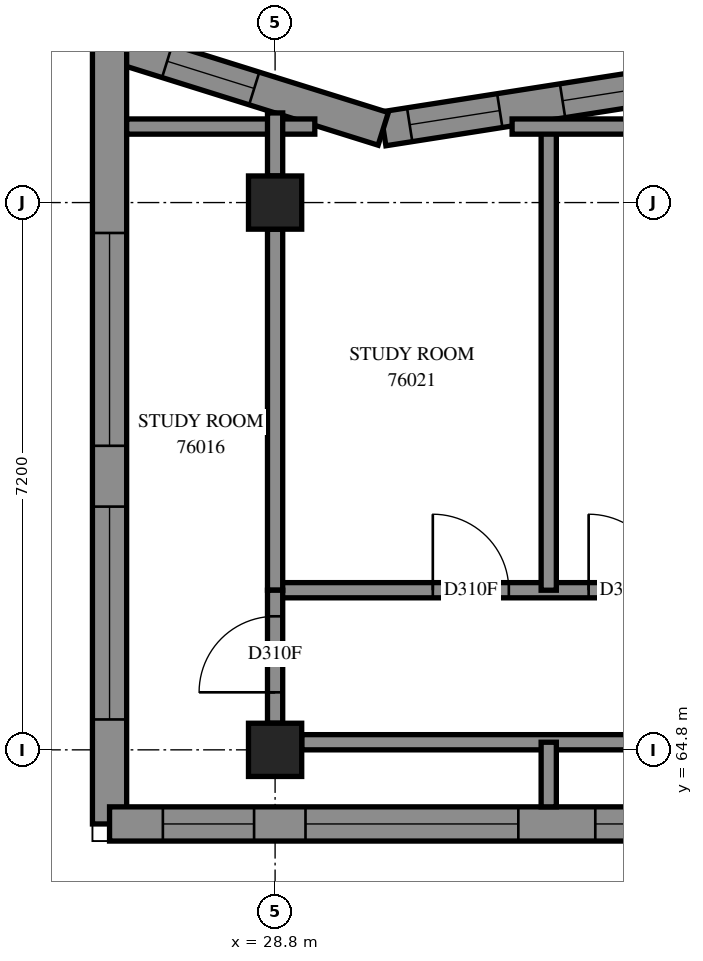
"""IFC4 building model, lengths in metres.
Left out: names, types, materials, properties, quantities, classifications, styles, units other than length and angle.
Written with IfcOpenShell. Run it as: python <this file> out.ifc"""

import sys

from ifc_helpers import new_model, si_unit, direction, frame, frame_2d, origin, origin_2d, place, context, subcontext, project, spatial, polyline, rectangle, outline, extrude, element, fill, save


model = new_model("IFC4")
c1 = context("Model", 3, precision=1e-05, world=origin(), true_north=direction((0.0, 1.0)))
c2 = subcontext(c1, "Body", "Model", "MODEL_VIEW")
j1 = project(units=[si_unit("LENGTHUNIT", "METRE"), si_unit("PLANEANGLEUNIT", "RADIAN")], contexts=[c1])
p1 = place(None, origin())
s1 = spatial("IfcSite", under=j1, at=p1, CompositionType="ELEMENT")
p2 = place(p1, origin())
s2 = spatial("IfcBuilding", under=s1, at=p2, CompositionType="ELEMENT")
p3 = place(p2, frame((0.0, 0.0, 277.8)))
s3 = spatial("IfcBuildingStorey", under=s2, at=p3, CompositionType="ELEMENT", Elevation=277.8)
for number, where, z_axis, x_axis in (
    (1, (28.8, 64.8, 0.0), (0.0, 0.0, 1.0), (1.0, 0.0, 0.0)),
    (2, (28.8, 72.0, 0.0), (0.0, 0.0, 1.0), (1.0, 0.0, 0.0)),
):
    element("IfcColumn", number, at=place(p3, frame(where, z_axis=z_axis, x_axis=x_axis)), inside=s3, PredefinedType="COLUMN", context=c2, shape_type="SweptSolid", body=[
        extrude(rectangle(XDim=0.7, YDim=0.7, at=origin_2d()), origin(), (0.0, 0.0, 1.0), 3.1),
    ])
p4 = place(p3, frame((34.083, 73.575, 0.0), z_axis=(0.0, 0.0, 1.0), x_axis=(-0.9879139938, -0.155003035, 0.0)))
e3 = element("IfcWall", 3, at=p4, inside=s3, PredefinedType="SOLIDWALL", context=c2, shape_type="SweptSolid", body=[
    extrude(outline(polyline([(-0.035, -0.225), (3.854, -0.225), (3.96, 0.225), (0.035, 0.225), (-0.035, -0.225)])), origin(), (0.0, 0.0, 1.0), 3.1),
])
p5 = place(p4, frame((0.319, 0.0, 0.45)))
e4 = element("IfcOpeningElement", 4, at=p5, cuts=e3, PredefinedType="OPENING", context=c2, shape_type="SweptSolid", body=[
    extrude(rectangle(XDim=1.2, YDim=2.55, at=frame_2d((0.6, 1.275))), frame((0.0, 0.235, 0.0), z_axis=(0.0, -1.0, 0.0), x_axis=(1.0, 0.0, 0.0)), (0.0, 0.0, 1.0), 0.47),
])
p6 = place(p4, frame((2.355, 0.0, 0.45)))
e5 = element("IfcOpeningElement", 5, at=p6, cuts=e3, PredefinedType="OPENING", context=c2, shape_type="SweptSolid", body=[
    extrude(rectangle(XDim=1.2, YDim=2.55, at=frame_2d((0.6, 1.275))), frame((0.0, 0.235, 0.0), z_axis=(0.0, -1.0, 0.0), x_axis=(1.0, 0.0, 0.0)), (0.0, 0.0, 1.0), 0.47),
])
p7 = place(p3, frame((30.223, 72.97, 0.0), z_axis=(0.0, 0.0, 1.0), x_axis=(-0.9543303604, 0.2987533486, 0.0)))
e6 = element("IfcWall", 6, at=p7, inside=s3, PredefinedType="SOLIDWALL", context=c2, shape_type="SweptSolid", body=[
    extrude(outline(polyline([(0.053, -0.225), (4.079, -0.225), (3.467, 0.225), (-0.053, 0.225), (0.053, -0.225)])), origin(), (0.0, 0.0, 1.0), 3.1),
])
p8 = place(p7, frame((1.779, 0.0, 0.45)))
e7 = element("IfcOpeningElement", 7, at=p8, cuts=e6, PredefinedType="OPENING", context=c2, shape_type="SweptSolid", body=[
    extrude(rectangle(XDim=1.2, YDim=2.55, at=frame_2d((0.6, 1.275))), frame((0.0, 0.235, 0.0), z_axis=(0.0, -1.0, 0.0), x_axis=(1.0, 0.0, 0.0)), (0.0, 0.0, 1.0), 0.47),
])
p9 = place(p3, frame((26.622, 74.097, 0.0), z_axis=(0.0, 0.0, 1.0), x_axis=(0.0, -1.0, 0.0)))
e8 = element("IfcWall", 8, at=p9, inside=s3, PredefinedType="SOLIDWALL", context=c2, shape_type="SweptSolid", body=[
    extrude(outline(polyline([(-0.306, -0.225), (10.497, -0.225), (10.047, 0.225), (0.306, 0.225), (-0.306, -0.225)])), origin(), (0.0, 0.0, 1.0), 3.1),
])
p10 = place(p9, frame((2.497, 0.0, 0.45)))
e9 = element("IfcOpeningElement", 9, at=p10, cuts=e8, PredefinedType="OPENING", context=c2, shape_type="SweptSolid", body=[
    extrude(rectangle(XDim=2.8, YDim=2.55, at=frame_2d((1.4, 1.275))), frame((0.0, 0.235, 0.0), z_axis=(0.0, -1.0, 0.0), x_axis=(1.0, 0.0, 0.0)), (0.0, 0.0, 1.0), 0.47),
])
p11 = place(p9, frame((6.097, 0.0, 0.45)))
e10 = element("IfcOpeningElement", 10, at=p11, cuts=e8, PredefinedType="OPENING", context=c2, shape_type="SweptSolid", body=[
    extrude(rectangle(XDim=2.8, YDim=2.55, at=frame_2d((1.4, 1.275))), frame((0.0, 0.235, 0.0), z_axis=(0.0, -1.0, 0.0), x_axis=(1.0, 0.0, 0.0)), (0.0, 0.0, 1.0), 0.47),
])
p12 = place(p3, frame((26.622, 63.825, 0.0), z_axis=(0.0, 0.0, 1.0), x_axis=(1.0, 0.0, 0.0)))
e11 = element("IfcWall", 11, at=p12, inside=s3, PredefinedType="SOLIDWALL", context=c2, shape_type="SweptSolid", body=[
    extrude(outline(polyline([(-0.225, -0.225), (8.178, -0.225), (8.628, 0.225), (0.225, 0.225), (-0.225, -0.225)])), origin(), (0.0, 0.0, 1.0), 3.1),
])
p13 = place(p12, frame((2.578, 0.0, 0.45)))
e12 = element("IfcOpeningElement", 12, at=p13, cuts=e11, PredefinedType="OPENING", context=c2, shape_type="SweptSolid", body=[
    extrude(rectangle(XDim=2.8, YDim=2.55, at=frame_2d((1.4, 1.275))), frame((0.0, 0.235, 0.0), z_axis=(0.0, -1.0, 0.0), x_axis=(1.0, 0.0, 0.0)), (0.0, 0.0, 1.0), 0.47),
])
p14 = place(p12, frame((0.702, 0.0, 0.45)))
e13 = element("IfcOpeningElement", 13, at=p14, cuts=e11, PredefinedType="OPENING", context=c2, shape_type="SweptSolid", body=[
    extrude(rectangle(XDim=1.2, YDim=2.55, at=frame_2d((0.6, 1.275))), frame((0.0, 0.235, 0.0), z_axis=(0.0, -1.0, 0.0), x_axis=(1.0, 0.0, 0.0)), (0.0, 0.0, 1.0), 0.47),
])
p15 = place(p12, frame((6.391, 0.0, 0.45)))
e14 = element("IfcOpeningElement", 14, at=p15, cuts=e11, PredefinedType="OPENING", context=c2, shape_type="SweptSolid", body=[
    extrude(rectangle(XDim=1.2, YDim=2.55, at=frame_2d((0.6, 1.275))), frame((0.0, 0.235, 0.0), z_axis=(0.0, -1.0, 0.0), x_axis=(1.0, 0.0, 0.0)), (0.0, 0.0, 1.0), 0.47),
])
p16 = place(p3, frame((28.8, 66.9, 0.0), z_axis=(0.0, 0.0, 1.0), x_axis=(1.0, 0.0, 0.0)))
e15 = element("IfcWall", 15, at=p16, inside=s3, PredefinedType="PARTITIONING", context=c2, shape_type="SweptSolid", body=[
    extrude(rectangle(XDim=11.8, YDim=0.2, at=frame_2d((5.9, 0.0))), origin(), (0.0, 0.0, 1.0), 3.1),
])
p17 = place(p16, frame((2.075, 0.0, 0.0)))
e16 = element("IfcOpeningElement", 16, at=p17, cuts=e15, PredefinedType="OPENING", context=c2, shape_type="SweptSolid", body=[
    extrude(rectangle(XDim=1.0, YDim=2.1, at=frame_2d((0.5, 1.05))), frame((0.0, 0.11, 0.0), z_axis=(0.0, -1.0, 0.0), x_axis=(1.0, 0.0, 0.0)), (0.0, 0.0, 1.0), 0.22),
])
p18 = place(p16, frame((9.275, 0.0, 0.0)))
e17 = element("IfcOpeningElement", 17, at=p18, cuts=e15, PredefinedType="OPENING", context=c2, shape_type="SweptSolid", body=[
    extrude(rectangle(XDim=1.0, YDim=2.1, at=frame_2d((0.5, 1.05))), frame((0.0, 0.11, 0.0), z_axis=(0.0, -1.0, 0.0), x_axis=(1.0, 0.0, 0.0)), (0.0, 0.0, 1.0), 0.22),
])
p19 = place(p16, frame((4.125, 0.0, 0.0)))
e18 = element("IfcOpeningElement", 18, at=p19, cuts=e15, PredefinedType="OPENING", context=c2, shape_type="SweptSolid", body=[
    extrude(rectangle(XDim=1.0, YDim=2.1, at=frame_2d((0.5, 1.05))), frame((0.0, 0.11, 0.0), z_axis=(0.0, -1.0, 0.0), x_axis=(1.0, 0.0, 0.0)), (0.0, 0.0, 1.0), 0.22),
])
p20 = place(p3, frame((29.15, 64.9, 0.0), z_axis=(0.0, 0.0, 1.0), x_axis=(1.0, 0.0, 0.0)))
e19 = element("IfcWall", 19, at=p20, inside=s3, PredefinedType="PARTITIONING", context=c2, shape_type="SweptSolid", body=[
    extrude(rectangle(XDim=6.5, YDim=0.2, at=frame_2d((3.25, 0.0))), origin(), (0.0, 0.0, 1.0), 2.6),
])
p21 = place(p3, frame((32.4, 66.9, 0.0), z_axis=(0.0, 0.0, 1.0), x_axis=(0.0, 1.0, 0.0)))
e20 = element("IfcWall", 20, at=p21, inside=s3, PredefinedType="PARTITIONING", context=c2, shape_type="SweptSolid", body=[
    extrude(rectangle(XDim=6.184, YDim=0.2, at=frame_2d((3.092, 0.0))), origin(), (0.0, 0.0, 1.0), 3.1),
])
p22 = place(p3, frame((28.8, 66.9, 0.0), z_axis=(0.0, 0.0, 1.0), x_axis=(0.0, 1.0, 0.0)))
e21 = element("IfcWall", 21, at=p22, inside=s3, PredefinedType="PARTITIONING", context=c2, shape_type="SweptSolid", body=[
    extrude(rectangle(XDim=4.75, YDim=0.2, at=frame_2d((2.375, 0.0))), origin(), (0.0, 0.0, 1.0), 2.6),
])
p23 = place(p3, frame((31.918, 73.0, 0.0), z_axis=(0.0, 0.0, 1.0), x_axis=(1.0, 0.0, 0.0)))
e22 = element("IfcWall", 22, at=p23, inside=s3, PredefinedType="PARTITIONING", context=c2, shape_type="SweptSolid", body=[
    extrude(rectangle(XDim=4.329, YDim=0.2, at=frame_2d((2.164, 0.0))), origin(), (0.0, 0.0, 1.0), 3.1),
])
p24 = place(p3, frame((26.847, 73.0, 0.0), z_axis=(0.0, 0.0, 1.0), x_axis=(1.0, 0.0, 0.0)))
e23 = element("IfcWall", 23, at=p24, inside=s3, PredefinedType="PARTITIONING", context=c2, shape_type="SweptSolid", body=[
    extrude(rectangle(XDim=2.475, YDim=0.2, at=frame_2d((1.238, 0.0))), origin(), (0.0, 0.0, 1.0), 3.1),
])
p25 = place(p3, frame((28.8, 65.15, 0.0), z_axis=(0.0, 0.0, 1.0), x_axis=(0.0, 1.0, 0.0)))
e24 = element("IfcWall", 24, at=p25, inside=s3, PredefinedType="PARTITIONING", context=c2, shape_type="SweptSolid", body=[
    extrude(rectangle(XDim=1.75, YDim=0.2, at=frame_2d((0.875, 0.0))), origin(), (0.0, 0.0, 1.0), 2.6),
])
p26 = place(p25, frame((0.407, 0.0, 0.0)))
e25 = element("IfcOpeningElement", 25, at=p26, cuts=e24, PredefinedType="OPENING", context=c2, shape_type="SweptSolid", body=[
    extrude(rectangle(XDim=1.0, YDim=2.1, at=frame_2d((0.5, 1.05))), frame((0.0, 0.11, 0.0), z_axis=(0.0, -1.0, 0.0), x_axis=(1.0, 0.0, 0.0)), (0.0, 0.0, 1.0), 0.22),
])
p27 = place(p3, frame((32.4, 64.05, 0.0), z_axis=(0.0, 0.0, 1.0), x_axis=(0.0, 1.0, 0.0)))
e26 = element("IfcWall", 26, at=p27, inside=s3, PredefinedType="PARTITIONING", context=c2, shape_type="SweptSolid", body=[
    extrude(rectangle(XDim=0.85, YDim=0.2, at=frame_2d((0.425, 0.0))), origin(), (0.0, 0.0, 1.0), 3.1),
])
p28 = place(p3, frame((28.8, 72.35, 0.0), z_axis=(0.0, 0.0, 1.0), x_axis=(0.0, 1.0, 0.0)))
e27 = element("IfcWall", 27, at=p28, inside=s3, PredefinedType="PARTITIONING", context=c2, shape_type="SweptSolid", body=[
    extrude(rectangle(XDim=0.829, YDim=0.2, at=frame_2d((0.415, 0.0))), origin(), (0.0, 0.0, 1.0), 3.1),
])
p29 = place(p5, origin())
e28 = element("IfcWindow", 28, at=p29, inside=s3, PartitioningType="SINGLE_PANEL", PredefinedType="WINDOW", context=c2, shape_type="SweptSolid", body=[
    extrude(rectangle(XDim=1.2, YDim=2.55, at=frame_2d((0.6, 1.275))), frame((0.0, 0.205, 0.0), z_axis=(0.0, -1.0, 0.0), x_axis=(1.0, 0.0, 0.0)), (0.0, 0.0, 1.0), 0.06),
])
fill(e4, e28)
p30 = place(p6, origin())
e29 = element("IfcWindow", 29, at=p30, inside=s3, PartitioningType="SINGLE_PANEL", PredefinedType="WINDOW", context=c2, shape_type="SweptSolid", body=[
    extrude(rectangle(XDim=1.2, YDim=2.55, at=frame_2d((0.6, 1.275))), frame((0.0, 0.205, 0.0), z_axis=(0.0, -1.0, 0.0), x_axis=(1.0, 0.0, 0.0)), (0.0, 0.0, 1.0), 0.06),
])
fill(e5, e29)
p31 = place(p8, origin())
e30 = element("IfcWindow", 30, at=p31, inside=s3, PartitioningType="SINGLE_PANEL", PredefinedType="WINDOW", context=c2, shape_type="SweptSolid", body=[
    extrude(rectangle(XDim=1.2, YDim=2.55, at=frame_2d((0.6, 1.275))), frame((0.0, 0.205, 0.0), z_axis=(0.0, -1.0, 0.0), x_axis=(1.0, 0.0, 0.0)), (0.0, 0.0, 1.0), 0.06),
])
fill(e7, e30)
p32 = place(p10, origin())
e31 = element("IfcWindow", 31, at=p32, inside=s3, PartitioningType="SINGLE_PANEL", PredefinedType="WINDOW", context=c2, shape_type="SweptSolid", body=[
    extrude(rectangle(XDim=2.8, YDim=2.55, at=frame_2d((1.4, 1.275))), frame((0.0, 0.205, 0.0), z_axis=(0.0, -1.0, 0.0), x_axis=(1.0, 0.0, 0.0)), (0.0, 0.0, 1.0), 0.06),
])
fill(e9, e31)
p33 = place(p11, origin())
e32 = element("IfcWindow", 32, at=p33, inside=s3, PartitioningType="SINGLE_PANEL", PredefinedType="WINDOW", context=c2, shape_type="SweptSolid", body=[
    extrude(rectangle(XDim=2.8, YDim=2.55, at=frame_2d((1.4, 1.275))), frame((0.0, 0.205, 0.0), z_axis=(0.0, -1.0, 0.0), x_axis=(1.0, 0.0, 0.0)), (0.0, 0.0, 1.0), 0.06),
])
fill(e10, e32)
p34 = place(p13, origin())
e33 = element("IfcWindow", 33, at=p34, inside=s3, PartitioningType="SINGLE_PANEL", PredefinedType="WINDOW", context=c2, shape_type="SweptSolid", body=[
    extrude(rectangle(XDim=2.8, YDim=2.55, at=frame_2d((1.4, 1.275))), frame((0.0, 0.205, 0.0), z_axis=(0.0, -1.0, 0.0), x_axis=(1.0, 0.0, 0.0)), (0.0, 0.0, 1.0), 0.06),
])
fill(e12, e33)
p35 = place(p14, origin())
e34 = element("IfcWindow", 34, at=p35, inside=s3, PartitioningType="SINGLE_PANEL", PredefinedType="WINDOW", context=c2, shape_type="SweptSolid", body=[
    extrude(rectangle(XDim=1.2, YDim=2.55, at=frame_2d((0.6, 1.275))), frame((0.0, 0.205, 0.0), z_axis=(0.0, -1.0, 0.0), x_axis=(1.0, 0.0, 0.0)), (0.0, 0.0, 1.0), 0.06),
])
fill(e13, e34)
p36 = place(p15, origin())
e35 = element("IfcWindow", 35, at=p36, inside=s3, PartitioningType="SINGLE_PANEL", PredefinedType="WINDOW", context=c2, shape_type="SweptSolid", body=[
    extrude(rectangle(XDim=1.2, YDim=2.55, at=frame_2d((0.6, 1.275))), frame((0.0, 0.205, 0.0), z_axis=(0.0, -1.0, 0.0), x_axis=(1.0, 0.0, 0.0)), (0.0, 0.0, 1.0), 0.06),
])
fill(e14, e35)
p37 = place(p26, origin())
e36 = element("IfcDoor", 36, at=p37, inside=s3, OperationType="SINGLE_SWING_LEFT", PredefinedType="DOOR", context=c2, shape_type="SweptSolid", body=[
    extrude(rectangle(XDim=1.0, YDim=2.1, at=frame_2d((0.5, 1.05))), frame((0.0, 0.025, 0.0), z_axis=(0.0, -1.0, 0.0), x_axis=(1.0, 0.0, 0.0)), (0.0, 0.0, 1.0), 0.05),
])
fill(e25, e36)
p38 = place(p17, origin())
e37 = element("IfcDoor", 37, at=p38, inside=s3, OperationType="SINGLE_SWING_RIGHT", PredefinedType="DOOR", context=c2, shape_type="SweptSolid", body=[
    extrude(rectangle(XDim=1.0, YDim=2.1, at=frame_2d((0.5, 1.05))), frame((0.0, 0.025, 0.0), z_axis=(0.0, -1.0, 0.0), x_axis=(1.0, 0.0, 0.0)), (0.0, 0.0, 1.0), 0.05),
])
fill(e16, e37)
p39 = place(p19, origin())
e38 = element("IfcDoor", 38, at=p39, inside=s3, OperationType="SINGLE_SWING_LEFT", PredefinedType="DOOR", context=c2, shape_type="SweptSolid", body=[
    extrude(rectangle(XDim=1.0, YDim=2.1, at=frame_2d((0.5, 1.05))), frame((0.0, 0.025, 0.0), z_axis=(0.0, -1.0, 0.0), x_axis=(1.0, 0.0, 0.0)), (0.0, 0.0, 1.0), 0.05),
])
fill(e18, e38)
save(model, sys.argv[1])
